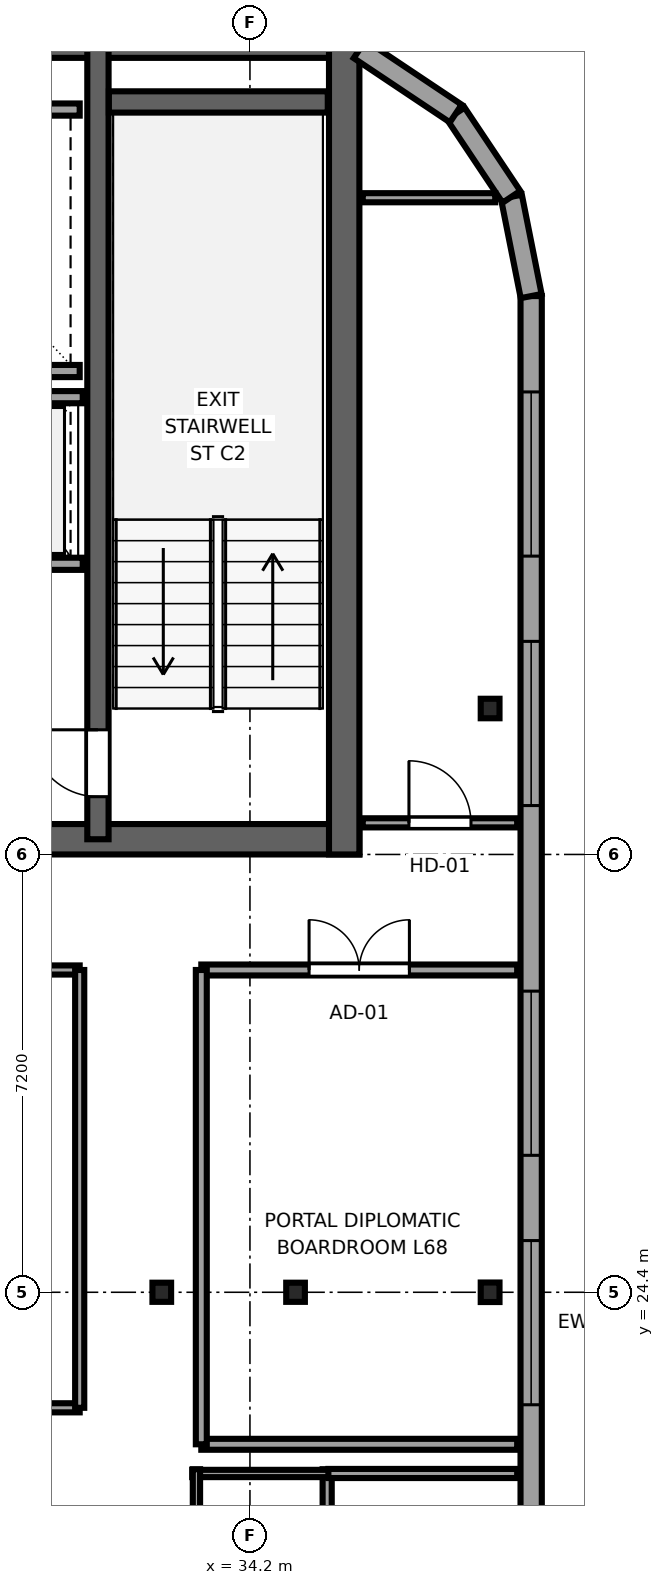
"""IFC4 building model, lengths in metres.
Left out: names, types, materials, properties, quantities, classifications, styles, units other than length and angle.
Written with IfcOpenShell. Run it as: python <this file> out.ifc"""

import sys

from ifc_helpers import new_model, si_unit, direction, frame, frame_2d, origin, origin_2d, place, context, subcontext, project, spatial, rectangle, i_section, extrude, source, transform, mapped, element, fill, save


model = new_model("IFC4")
c1 = context("Model", 3, precision=1e-05, world=origin(), true_north=direction((0.0, 1.0)))
c2 = subcontext(c1, "Body", "Model", "MODEL_VIEW")
j1 = project(units=[si_unit("LENGTHUNIT", "METRE"), si_unit("PLANEANGLEUNIT", "RADIAN")], contexts=[c1])
p1 = place(None, origin())
s1 = spatial("IfcSite", under=j1, at=p1, CompositionType="ELEMENT")
p2 = place(p1, origin())
s2 = spatial("IfcBuilding", under=s1, at=p2, CompositionType="ELEMENT")
p3 = place(p2, frame((0.0, 0.0, 255.85)))
s3 = spatial("IfcBuildingStorey", under=s2, at=p3, CompositionType="ELEMENT", Elevation=255.85)
p4 = place(p3, frame((10.0, 31.85, 0.0), z_axis=(0.0, 0.0, 1.0), x_axis=(1.0, 0.0, 0.0)))
e1 = element("IfcWall", 1, at=p4, inside=s3, PredefinedType="SHEAR", context=c2, shape_type="SweptSolid", body=[
    extrude(rectangle(XDim=26.0, YDim=0.5, at=frame_2d((13.0, 0.0))), origin(), (0.0, 0.0, 1.0), 3.55),
])
p5 = place(p4, frame((7.45, 0.0, 0.0), z_axis=(0.0, 0.0, 1.0), x_axis=(-1.0, 0.0, 0.0)))
e2 = element("IfcOpeningElement", 2, at=p5, cuts=e1, PredefinedType="OPENING", context=c2, shape_type="SweptSolid", body=[
    extrude(rectangle(XDim=1.5, YDim=2.04, at=frame_2d((0.75, 1.02))), frame((0.0, 0.26, 0.0), z_axis=(0.0, -1.0, 0.0), x_axis=(1.0, 0.0, 0.0)), (0.0, 0.0, 1.0), 0.52),
])
p6 = place(p4, frame((13.75, 0.0, 0.0), z_axis=(0.0, 0.0, 1.0), x_axis=(-1.0, 0.0, 0.0)))
e3 = element("IfcOpeningElement", 3, at=p6, cuts=e1, PredefinedType="OPENING", context=c2, shape_type="SweptSolid", body=[
    extrude(rectangle(XDim=1.5, YDim=2.04, at=frame_2d((0.75, 1.02))), frame((0.0, 0.26, 0.0), z_axis=(0.0, -1.0, 0.0), x_axis=(1.0, 0.0, 0.0)), (0.0, 0.0, 1.0), 0.52),
])
p7 = place(p4, frame((20.05, 0.0, 0.0), z_axis=(0.0, 0.0, 1.0), x_axis=(-1.0, 0.0, 0.0)))
e4 = element("IfcOpeningElement", 4, at=p7, cuts=e1, PredefinedType="OPENING", context=c2, shape_type="SweptSolid", body=[
    extrude(rectangle(XDim=1.5, YDim=2.04, at=frame_2d((0.75, 1.02))), frame((0.0, 0.26, 0.0), z_axis=(0.0, -1.0, 0.0), x_axis=(1.0, 0.0, 0.0)), (0.0, 0.0, 1.0), 0.52),
])
p8 = place(p3, frame((10.0, 44.95, 0.0), z_axis=(0.0, 0.0, 1.0), x_axis=(1.0, 0.0, 0.0)))
e5 = element("IfcWall", 5, at=p8, inside=s3, PredefinedType="SHEAR", context=c2, shape_type="SweptSolid", body=[
    extrude(rectangle(XDim=26.0, YDim=0.5, at=frame_2d((13.0, 0.0))), origin(), (0.0, 0.0, 1.0), 3.55),
])
p9 = place(p3, frame((35.75, 31.6, 0.0), z_axis=(0.0, 0.0, 1.0), x_axis=(0.0, 1.0, 0.0)))
e6 = element("IfcWall", 6, at=p9, inside=s3, PredefinedType="SHEAR", context=c2, shape_type="SweptSolid", body=[
    extrude(rectangle(XDim=13.6, YDim=0.5, at=frame_2d((6.8, 0.0))), origin(), (0.0, 0.0, 1.0), 3.55),
])
p10 = place(p3, frame((31.7, 31.85, 0.0), z_axis=(0.0, 0.0, 1.0), x_axis=(0.0, 1.0, 0.0)))
e7 = element("IfcWall", 7, at=p10, inside=s3, PredefinedType="SHEAR", context=c2, shape_type="SweptSolid", body=[
    extrude(rectangle(XDim=13.1, YDim=0.35, at=frame_2d((6.55, 0.0))), origin(), (0.0, 0.0, 1.0), 3.55),
])
p11 = place(p10, frame((1.8, 0.0, 0.0), z_axis=(0.0, 0.0, 1.0), x_axis=(-1.0, 0.0, 0.0)))
e8 = element("IfcOpeningElement", 8, at=p11, cuts=e7, PredefinedType="OPENING", context=c2, shape_type="SweptSolid", body=[
    extrude(rectangle(XDim=1.1, YDim=2.12, at=frame_2d((0.55, 1.06))), frame((0.0, 0.185, 0.0), z_axis=(0.0, -1.0, 0.0), x_axis=(1.0, 0.0, 0.0)), (0.0, 0.0, 1.0), 0.37),
])
p12 = place(p3, frame((31.88, 43.975, 0.0), z_axis=(0.0, 0.0, 1.0), x_axis=(1.0, 0.0, 0.0)))
e9 = element("IfcWall", 9, at=p12, inside=s3, PredefinedType="SHEAR", context=c2, shape_type="SweptSolid", body=[
    extrude(rectangle(XDim=3.6, YDim=0.35, at=frame_2d((1.8, 0.0))), origin(), (0.0, 0.0, 1.0), 3.55),
])
m1 = source(origin(), c2, "Body", "SweptSolid", [
    extrude(i_section(OverallWidth=0.307, OverallDepth=0.315, WebThickness=0.012, FlangeThickness=0.019, FilletRadius=0.017, at=origin_2d()), origin(), (0.0, 0.0, 1.0), 3.55),
])
for number, where, z_axis, x_axis in (
    (10, (32.75, 24.4, 0.0), (0.0, 0.0, 1.0), (1.0, 0.0, 0.0)),
    (11, (34.95, 24.4, 0.0), (0.0, 0.0, 1.0), (1.0, 0.0, 0.0)),
):
    element("IfcColumn", number, at=place(p3, frame(where, z_axis=z_axis, x_axis=x_axis)), inside=s3, PredefinedType="COLUMN", context=c2, shape_type="MappedRepresentation", body=[
        mapped(m1, transform((0.0, 0.0, 0.0), x_axis=(1.0, 0.0, 0.0), y_axis=(0.0, 1.0, 0.0), z_axis=(0.0, 0.0, 1.0), scale=1.0)),
    ])
m2 = source(origin(), c2, "Body", "SweptSolid", [
    extrude(i_section(OverallWidth=0.309, OverallDepth=0.321, WebThickness=0.014, FlangeThickness=0.022, FilletRadius=0.017, at=origin_2d()), origin(), (0.0, 0.0, 1.0), 3.55),
])
for number, where, z_axis, x_axis in (
    (12, (38.15, 24.4, 0.0), (0.0, 0.0, 1.0), (1.0, 0.0, 0.0)),
    (13, (38.15, 34.0, 0.0), (0.0, 0.0, 1.0), (1.0, 0.0, 0.0)),
):
    element("IfcColumn", number, at=place(p3, frame(where, z_axis=z_axis, x_axis=x_axis)), inside=s3, PredefinedType="COLUMN", context=c2, shape_type="MappedRepresentation", body=[
        mapped(m2, transform((0.0, 0.0, 0.0), x_axis=(1.0, 0.0, 0.0), y_axis=(0.0, 1.0, 0.0), z_axis=(0.0, 0.0, 1.0), scale=1.0)),
    ])
p13 = place(p3, frame((38.825, 7.017, 0.0), z_axis=(0.0, 0.0, 1.0), x_axis=(0.0, 1.0, 0.0)))
e14 = element("IfcWall", 14, at=p13, inside=s3, PredefinedType="SOLIDWALL", context=c2, shape_type="SweptSolid", body=[
    extrude(rectangle(XDim=33.766, YDim=0.35, at=frame_2d((16.883, 0.0))), origin(), (0.0, 0.0, 1.0), 3.37),
])
p14 = place(p13, frame((10.881, 0.0, 0.68)))
e15 = element("IfcOpeningElement", 15, at=p14, cuts=e14, PredefinedType="OPENING", context=c2, shape_type="SweptSolid", body=[
    extrude(rectangle(XDim=2.7, YDim=1.95, at=frame_2d((1.35, 0.975))), frame((0.0, 0.185, 0.0), z_axis=(0.0, -1.0, 0.0), x_axis=(1.0, 0.0, 0.0)), (0.0, 0.0, 1.0), 0.37),
])
p15 = place(p13, frame((15.533, 0.0, 0.68)))
e16 = element("IfcOpeningElement", 16, at=p15, cuts=e14, PredefinedType="OPENING", context=c2, shape_type="SweptSolid", body=[
    extrude(rectangle(XDim=2.7, YDim=1.95, at=frame_2d((1.35, 0.975))), frame((0.0, 0.185, 0.0), z_axis=(0.0, -1.0, 0.0), x_axis=(1.0, 0.0, 0.0)), (0.0, 0.0, 1.0), 0.37),
])
p16 = place(p13, frame((19.635, 0.0, 0.68)))
e17 = element("IfcOpeningElement", 17, at=p16, cuts=e14, PredefinedType="OPENING", context=c2, shape_type="SweptSolid", body=[
    extrude(rectangle(XDim=2.7, YDim=1.95, at=frame_2d((1.35, 0.975))), frame((0.0, 0.185, 0.0), z_axis=(0.0, -1.0, 0.0), x_axis=(1.0, 0.0, 0.0)), (0.0, 0.0, 1.0), 0.37),
])
p17 = place(p13, frame((25.387, 0.0, 0.68)))
e18 = element("IfcOpeningElement", 18, at=p17, cuts=e14, PredefinedType="OPENING", context=c2, shape_type="SweptSolid", body=[
    extrude(rectangle(XDim=2.7, YDim=1.95, at=frame_2d((1.35, 0.975))), frame((0.0, 0.185, 0.0), z_axis=(0.0, -1.0, 0.0), x_axis=(1.0, 0.0, 0.0)), (0.0, 0.0, 1.0), 0.37),
])
p18 = place(p13, frame((29.489, 0.0, 0.68)))
e19 = element("IfcOpeningElement", 19, at=p18, cuts=e14, PredefinedType="OPENING", context=c2, shape_type="SweptSolid", body=[
    extrude(rectangle(XDim=2.7, YDim=1.95, at=frame_2d((1.35, 0.975))), frame((0.0, 0.185, 0.0), z_axis=(0.0, -1.0, 0.0), x_axis=(1.0, 0.0, 0.0)), (0.0, 0.0, 1.0), 0.37),
])
p19 = place(p13, frame((0.686, 0.0, 0.62)))
e20 = element("IfcOpeningElement", 20, at=p19, cuts=e14, PredefinedType="OPENING", context=c2, shape_type="SweptSolid", body=[
    extrude(rectangle(XDim=1.5, YDim=1.55, at=frame_2d((0.75, 0.775))), frame((0.0, 0.185, 0.0), z_axis=(0.0, -1.0, 0.0), x_axis=(1.0, 0.0, 0.0)), (0.0, 0.0, 1.0), 0.37),
])
p20 = place(p13, frame((4.733, 0.0, 0.62)))
e21 = element("IfcOpeningElement", 21, at=p20, cuts=e14, PredefinedType="OPENING", context=c2, shape_type="SweptSolid", body=[
    extrude(rectangle(XDim=1.5, YDim=1.55, at=frame_2d((0.75, 0.775))), frame((0.0, 0.185, 0.0), z_axis=(0.0, -1.0, 0.0), x_axis=(1.0, 0.0, 0.0)), (0.0, 0.0, 1.0), 0.37),
])
p21 = place(p3, frame((38.825, 40.783, 0.0), z_axis=(0.0, 0.0, 1.0), x_axis=(-0.195044345786, 0.980794424524, 0.0)))
e22 = element("IfcWall", 22, at=p21, inside=s3, PredefinedType="SOLIDWALL", context=c2, shape_type="SweptSolid", body=[
    extrude(rectangle(XDim=1.665, YDim=0.35, at=frame_2d((0.833, 0.0))), origin(), (0.0, 0.0, 1.0), 3.37),
])
p22 = place(p3, frame((38.5, 42.416, 0.0), z_axis=(0.0, 0.0, 1.0), x_axis=(-0.555520825599, 0.831502623162, 0.0)))
e23 = element("IfcWall", 23, at=p22, inside=s3, PredefinedType="SOLIDWALL", context=c2, shape_type="SweptSolid", body=[
    extrude(rectangle(XDim=1.647, YDim=0.35, at=frame_2d((0.824, 0.0))), origin(), (0.0, 0.0, 1.0), 3.37),
])
p23 = place(p3, frame((37.585, 43.785, 0.0), z_axis=(0.0, 0.0, 1.0), x_axis=(-0.831516639465, 0.555499845448, 0.0)))
e24 = element("IfcWall", 24, at=p23, inside=s3, PredefinedType="SOLIDWALL", context=c2, shape_type="SweptSolid", body=[
    extrude(rectangle(XDim=1.902, YDim=0.35, at=frame_2d((0.951, 0.0))), origin(), (0.0, 0.0, 1.0), 3.37),
])
for number, where, z_axis, x_axis in (
    (25, (27.3, 39.55, 0.0), (0.0, 0.0, 1.0), (1.0, 0.0, 0.0)),
    (26, (27.3, 43.85, 0.0), (0.0, 0.0, 1.0), (1.0, 0.0, 0.0)),
):
    element("IfcWall", number, at=place(p3, frame(where, z_axis=z_axis, x_axis=x_axis)), inside=s3, PredefinedType="SOLIDWALL", context=c2, shape_type="SweptSolid", body=[
        extrude(rectangle(XDim=4.1, YDim=0.2, at=frame_2d((2.05, 0.0))), origin(), (0.0, 0.0, 1.0), 3.37),
    ])
p24 = place(p3, frame((27.375, 36.38, 0.0), z_axis=(0.0, 0.0, 1.0), x_axis=(1.0, 0.0, 0.0)))
e27 = element("IfcWall", 27, at=p24, inside=s3, PredefinedType="SOLIDWALL", context=c2, shape_type="SweptSolid", body=[
    extrude(rectangle(XDim=4.075, YDim=0.2, at=frame_2d((2.038, 0.0))), origin(), (0.0, 0.0, 1.0), 3.37),
])
p25 = place(p24, frame((0.525, 0.0, 0.0)))
e28 = element("IfcOpeningElement", 28, at=p25, cuts=e27, PredefinedType="OPENING", context=c2, shape_type="SweptSolid", body=[
    extrude(rectangle(XDim=1.1, YDim=2.12, at=frame_2d((0.55, 1.06))), frame((0.0, 0.11, 0.0), z_axis=(0.0, -1.0, 0.0), x_axis=(1.0, 0.0, 0.0)), (0.0, 0.0, 1.0), 0.22),
])
p26 = place(p24, frame((2.425, 0.0, 0.0)))
e29 = element("IfcOpeningElement", 29, at=p26, cuts=e27, PredefinedType="OPENING", context=c2, shape_type="SweptSolid", body=[
    extrude(rectangle(XDim=1.1, YDim=2.12, at=frame_2d((0.55, 1.06))), frame((0.0, 0.11, 0.0), z_axis=(0.0, -1.0, 0.0), x_axis=(1.0, 0.0, 0.0)), (0.0, 0.0, 1.0), 0.22),
])
p27 = place(p3, frame((27.375, 39.12, 0.0), z_axis=(0.0, 0.0, 1.0), x_axis=(1.0, 0.0, 0.0)))
e30 = element("IfcWall", 30, at=p27, inside=s3, PredefinedType="SOLIDWALL", context=c2, shape_type="SweptSolid", body=[
    extrude(rectangle(XDim=4.075, YDim=0.2, at=frame_2d((2.038, 0.0))), origin(), (0.0, 0.0, 1.0), 3.37),
])
p28 = place(p3, frame((35.47, 19.1, 0.0), z_axis=(0.0, 0.0, 1.0), x_axis=(0.0, 1.0, 0.0)))
e31 = element("IfcWall", 31, at=p28, inside=s3, PredefinedType="PARTITIONING", context=c2, shape_type="SweptSolid", body=[
    extrude(rectangle(XDim=2.39, YDim=0.15, at=frame_2d((1.195, 0.0))), origin(), (0.0, 0.0, 1.0), 3.37),
])
p29 = place(p28, frame((0.665, 0.0, 0.0)))
e32 = element("IfcOpeningElement", 32, at=p29, cuts=e31, PredefinedType="OPENING", context=c2, shape_type="SweptSolid", body=[
    extrude(rectangle(XDim=0.92, YDim=2.01, at=frame_2d((0.46, 1.005))), frame((0.0, 0.085, 0.0), z_axis=(0.0, -1.0, 0.0), x_axis=(1.0, 0.0, 0.0)), (0.0, 0.0, 1.0), 0.17),
])
p30 = place(p3, frame((33.25, 21.42, 0.0), z_axis=(0.0, 0.0, 1.0), x_axis=(1.0, 0.0, 0.0)))
e33 = element("IfcWall", 33, at=p30, inside=s3, PredefinedType="PLUMBINGWALL", context=c2, shape_type="SweptSolid", body=[
    extrude(rectangle(XDim=2.29, YDim=0.12, at=frame_2d((1.145, 0.0))), origin(), (0.0, 0.0, 1.0), 3.37),
])
p31 = place(p3, frame((33.32, 19.1, 0.0), z_axis=(0.0, 0.0, 1.0), x_axis=(0.0, 1.0, 0.0)))
e34 = element("IfcWall", 34, at=p31, inside=s3, PredefinedType="PLUMBINGWALL", context=c2, shape_type="SweptSolid", body=[
    extrude(rectangle(XDim=2.39, YDim=0.12, at=frame_2d((1.195, 0.0))), origin(), (0.0, 0.0, 1.0), 3.37),
])
p32 = place(p3, frame((35.49, 21.42, 0.0), z_axis=(0.0, 0.0, 1.0), x_axis=(1.0, 0.0, 0.0)))
e35 = element("IfcWall", 35, at=p32, inside=s3, PredefinedType="PARTITIONING", context=c2, shape_type="SweptSolid", body=[
    extrude(rectangle(XDim=3.105, YDim=0.15, at=frame_2d((1.552, 0.0))), origin(), (0.0, 0.0, 1.0), 3.37),
])
p33 = place(p3, frame((25.6, 22.5, 0.0), z_axis=(0.0, 0.0, 1.0), x_axis=(1.0, 0.0, 0.0)))
e36 = element("IfcWall", 36, at=p33, inside=s3, PredefinedType="PARTITIONING", context=c2, shape_type="SweptSolid", body=[
    extrude(rectangle(XDim=5.8, YDim=0.15, at=frame_2d((2.9, 0.0))), origin(), (0.0, 0.0, 1.0), 3.37),
])
p34 = place(p33, frame((2.075, 0.0, 0.0)))
e37 = element("IfcOpeningElement", 37, at=p34, cuts=e36, PredefinedType="OPENING", context=c2, shape_type="SweptSolid", body=[
    extrude(rectangle(XDim=1.65, YDim=2.15, at=frame_2d((0.825, 1.075))), frame((0.0, 0.085, 0.0), z_axis=(0.0, -1.0, 0.0), x_axis=(1.0, 0.0, 0.0)), (0.0, 0.0, 1.0), 0.17),
])
p35 = place(p3, frame((25.6, 29.7, 0.0), z_axis=(0.0, 0.0, 1.0), x_axis=(1.0, 0.0, 0.0)))
e38 = element("IfcWall", 38, at=p35, inside=s3, PredefinedType="PARTITIONING", context=c2, shape_type="SweptSolid", body=[
    extrude(rectangle(XDim=5.8, YDim=0.15, at=frame_2d((2.9, 0.0))), origin(), (0.0, 0.0, 1.0), 3.37),
])
p36 = place(p3, frame((31.4, 22.5, 0.0), z_axis=(0.0, 0.0, 1.0), x_axis=(0.0, 1.0, 0.0)))
e39 = element("IfcWall", 39, at=p36, inside=s3, PredefinedType="PARTITIONING", context=c2, shape_type="SweptSolid", body=[
    extrude(rectangle(XDim=7.2, YDim=0.15, at=frame_2d((3.6, 0.0))), origin(), (0.0, 0.0, 1.0), 3.37),
])
p37 = place(p3, frame((36.055, 32.12, 0.0), z_axis=(0.0, 0.0, 1.0), x_axis=(1.0, 0.0, 0.0)))
e40 = element("IfcWall", 40, at=p37, inside=s3, PredefinedType="PARTITIONING", context=c2, shape_type="SweptSolid", body=[
    extrude(rectangle(XDim=2.54, YDim=0.15, at=frame_2d((1.27, 0.0))), origin(), (0.0, 0.0, 1.0), 3.37),
])
p38 = place(p37, frame((0.76, 0.0, 0.0)))
e41 = element("IfcOpeningElement", 41, at=p38, cuts=e40, PredefinedType="OPENING", context=c2, shape_type="SweptSolid", body=[
    extrude(rectangle(XDim=1.02, YDim=2.03, at=frame_2d((0.51, 1.015))), frame((0.0, 0.085, 0.0), z_axis=(0.0, -1.0, 0.0), x_axis=(1.0, 0.0, 0.0)), (0.0, 0.0, 1.0), 0.17),
])
p39 = place(p3, frame((36.055, 42.4, 0.0), z_axis=(0.0, 0.0, 1.0), x_axis=(1.0, 0.0, 0.0)))
e42 = element("IfcWall", 42, at=p39, inside=s3, PredefinedType="PARTITIONING", context=c2, shape_type="SweptSolid", body=[
    extrude(rectangle(XDim=2.179, YDim=0.15, at=frame_2d((1.089, 0.0))), origin(), (0.0, 0.0, 1.0), 3.37),
])
p40 = place(p3, frame((33.4, 21.9, 0.0), z_axis=(0.0, 0.0, 1.0), x_axis=(1.0, 0.0, 0.0)))
e43 = element("IfcWall", 43, at=p40, inside=s3, PredefinedType="PARTITIONING", context=c2, shape_type="SweptSolid", body=[
    extrude(rectangle(XDim=5.195, YDim=0.18, at=frame_2d((2.598, 0.0))), origin(), (0.0, 0.0, 1.0), 3.37),
])
p41 = place(p3, frame((33.4, 29.7, 0.0), z_axis=(0.0, 0.0, 1.0), x_axis=(1.0, 0.0, 0.0)))
e44 = element("IfcWall", 44, at=p41, inside=s3, PredefinedType="PARTITIONING", context=c2, shape_type="SweptSolid", body=[
    extrude(rectangle(XDim=5.195, YDim=0.18, at=frame_2d((2.598, 0.0))), origin(), (0.0, 0.0, 1.0), 3.37),
])
p42 = place(p41, frame((1.772, 0.0, 0.0)))
e45 = element("IfcOpeningElement", 45, at=p42, cuts=e44, PredefinedType="OPENING", context=c2, shape_type="SweptSolid", body=[
    extrude(rectangle(XDim=1.65, YDim=2.15, at=frame_2d((0.825, 1.075))), frame((0.0, 0.1, 0.0), z_axis=(0.0, -1.0, 0.0), x_axis=(1.0, 0.0, 0.0)), (0.0, 0.0, 1.0), 0.2),
])
p43 = place(p3, frame((33.4, 21.9, 0.0), z_axis=(0.0, 0.0, 1.0), x_axis=(0.0, 1.0, 0.0)))
e46 = element("IfcWall", 46, at=p43, inside=s3, PredefinedType="PARTITIONING", context=c2, shape_type="SweptSolid", body=[
    extrude(rectangle(XDim=7.8, YDim=0.18, at=frame_2d((3.9, 0.0))), origin(), (0.0, 0.0, 1.0), 3.37),
])
m3 = source(origin(), c2, "Body", "SweptSolid", [
    extrude(rectangle(XDim=2.7, YDim=1.95, at=frame_2d((1.35, 0.975))), frame((0.0, 0.09, 0.0), z_axis=(0.0, -1.0, 0.0), x_axis=(1.0, 0.0, 0.0)), (0.0, 0.0, 1.0), 0.06),
])
p44 = place(p15, origin())
e47 = element("IfcWindow", 47, at=p44, inside=s3, PartitioningType="TRIPLE_PANEL_HORIZONTAL", PredefinedType="WINDOW", context=c2, shape_type="MappedRepresentation", body=[
    mapped(m3, transform((0.0, 0.0, 0.0), x_axis=(1.0, 0.0, 0.0), y_axis=(0.0, 1.0, 0.0), z_axis=(0.0, 0.0, 1.0), scale=1.0)),
])
fill(e16, e47)
p45 = place(p16, origin())
e48 = element("IfcWindow", 48, at=p45, inside=s3, PartitioningType="TRIPLE_PANEL_HORIZONTAL", PredefinedType="WINDOW", context=c2, shape_type="MappedRepresentation", body=[
    mapped(m3, transform((0.0, 0.0, 0.0), x_axis=(1.0, 0.0, 0.0), y_axis=(0.0, 1.0, 0.0), z_axis=(0.0, 0.0, 1.0), scale=1.0)),
])
fill(e17, e48)
p46 = place(p17, origin())
e49 = element("IfcWindow", 49, at=p46, inside=s3, PartitioningType="TRIPLE_PANEL_HORIZONTAL", PredefinedType="WINDOW", context=c2, shape_type="MappedRepresentation", body=[
    mapped(m3, transform((0.0, 0.0, 0.0), x_axis=(1.0, 0.0, 0.0), y_axis=(0.0, 1.0, 0.0), z_axis=(0.0, 0.0, 1.0), scale=1.0)),
])
fill(e18, e49)
p47 = place(p18, origin())
e50 = element("IfcWindow", 50, at=p47, inside=s3, PartitioningType="TRIPLE_PANEL_HORIZONTAL", PredefinedType="WINDOW", context=c2, shape_type="MappedRepresentation", body=[
    mapped(m3, transform((0.0, 0.0, 0.0), x_axis=(1.0, 0.0, 0.0), y_axis=(0.0, 1.0, 0.0), z_axis=(0.0, 0.0, 1.0), scale=1.0)),
])
fill(e19, e50)
m4 = source(origin(), c2, "Body", "SweptSolid", [
    extrude(rectangle(XDim=1.1, YDim=2.12, at=frame_2d((0.55, 1.06))), frame((0.0, 0.025, 0.0), z_axis=(0.0, -1.0, 0.0), x_axis=(1.0, 0.0, 0.0)), (0.0, 0.0, 1.0), 0.05),
])
p48 = place(p11, origin())
e51 = element("IfcDoor", 51, at=p48, inside=s3, OperationType="SINGLE_SWING_RIGHT", PredefinedType="DOOR", context=c2, shape_type="MappedRepresentation", body=[
    mapped(m4, transform((0.0, 0.0, 0.0), x_axis=(1.0, 0.0, 0.0), y_axis=(0.0, 1.0, 0.0), z_axis=(0.0, 0.0, 1.0), scale=1.0)),
])
fill(e8, e51)
m5 = source(origin(), c2, "Body", "SweptSolid", [
    extrude(rectangle(XDim=1.02, YDim=2.03, at=frame_2d((0.51, 1.015))), frame((0.0, 0.025, 0.0), z_axis=(0.0, -1.0, 0.0), x_axis=(1.0, 0.0, 0.0)), (0.0, 0.0, 1.0), 0.05),
])
p49 = place(p38, origin())
e52 = element("IfcDoor", 52, at=p49, inside=s3, OperationType="SINGLE_SWING_LEFT", PredefinedType="DOOR", context=c2, shape_type="MappedRepresentation", body=[
    mapped(m5, transform((0.0, 0.0, 0.0), x_axis=(1.0, 0.0, 0.0), y_axis=(0.0, 1.0, 0.0), z_axis=(0.0, 0.0, 1.0), scale=1.0)),
])
fill(e41, e52)
m6 = source(origin(), c2, "Body", "SweptSolid", [
    extrude(rectangle(XDim=1.65, YDim=2.15, at=frame_2d((0.825, 1.075))), frame((0.0, 0.025, 0.0), z_axis=(0.0, -1.0, 0.0), x_axis=(1.0, 0.0, 0.0)), (0.0, 0.0, 1.0), 0.05),
])
p50 = place(p42, origin())
e53 = element("IfcDoor", 53, at=p50, inside=s3, OperationType="DOUBLE_DOOR_SINGLE_SWING", PredefinedType="DOOR", context=c2, shape_type="MappedRepresentation", body=[
    mapped(m6, transform((0.0, 0.0, 0.0), x_axis=(1.0, 0.0, 0.0), y_axis=(0.0, 1.0, 0.0), z_axis=(0.0, 0.0, 1.0), scale=1.0)),
])
fill(e45, e53)
save(model, sys.argv[1])
